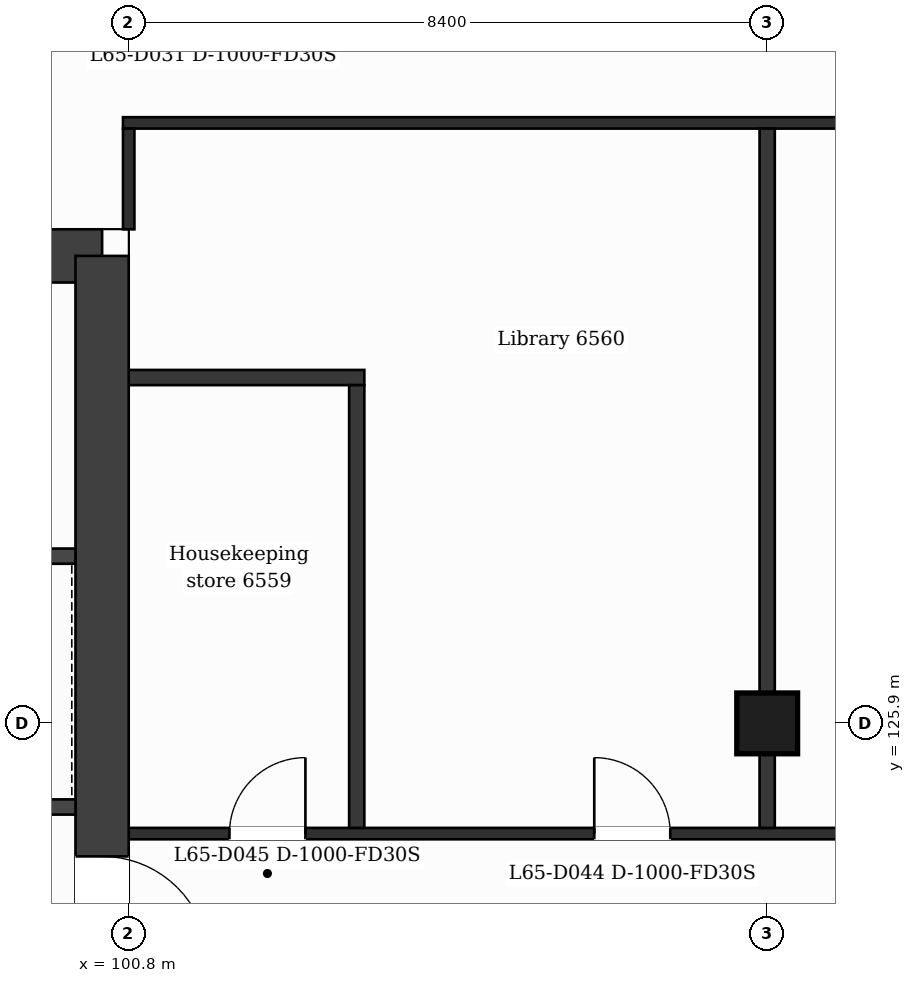
"""IFC4 building model, lengths in metres.
Left out: names, types, materials, properties, quantities, classifications, styles, units other than length and angle.
Written with IfcOpenShell. Run it as: python <this file> out.ifc"""

import sys

from ifc_helpers import new_model, si_unit, direction, frame, frame_2d, origin, origin_2d, place, context, subcontext, project, spatial, rectangle, extrude, element, fill, save


model = new_model("IFC4")
c1 = context("Model", 3, precision=1e-05, world=origin(), true_north=direction((0.0, 1.0)))
c2 = subcontext(c1, "Body", "Model", "MODEL_VIEW")
j1 = project(units=[si_unit("LENGTHUNIT", "METRE"), si_unit("PLANEANGLEUNIT", "RADIAN")], contexts=[c1])
p1 = place(None, origin())
s1 = spatial("IfcSite", under=j1, at=p1, CompositionType="ELEMENT")
p2 = place(p1, origin())
s2 = spatial("IfcBuilding", under=s1, at=p2, CompositionType="ELEMENT")
p3 = place(p2, frame((0.0, 0.0, 270.1)))
s3 = spatial("IfcBuildingStorey", under=s2, at=p3, CompositionType="ELEMENT", Elevation=270.1)
p4 = place(p3, frame((88.937, 132.05, 0.0), z_axis=(0.0, 0.0, 1.0), x_axis=(1.0, 0.0, 0.0)))
e1 = element("IfcWall", 1, at=p4, inside=s3, PredefinedType="SHEAR", context=c2, shape_type="SweptSolid", body=[
    extrude(rectangle(XDim=11.513, YDim=0.7, at=frame_2d((5.757, 0.0))), origin(), (0.0, 0.0, 1.0), 3.7),
])
p5 = place(p4, frame((6.927, 0.0, 0.0)))
e2 = element("IfcOpeningElement", 2, at=p5, cuts=e1, PredefinedType="OPENING", context=c2, shape_type="SweptSolid", body=[
    extrude(rectangle(XDim=1.2, YDim=2.1, at=frame_2d((0.6, 1.05))), frame((0.0, 0.36, 0.0), z_axis=(0.0, -1.0, 0.0), x_axis=(1.0, 0.0, 0.0)), (0.0, 0.0, 1.0), 0.72),
])
p6 = place(p3, frame((100.45, 132.05, 0.0), z_axis=(0.0, 0.0, 1.0), x_axis=(0.0, -1.0, 0.0)))
e3 = element("IfcWall", 3, at=p6, inside=s3, PredefinedType="SHEAR", context=c2, shape_type="SweptSolid", body=[
    extrude(rectangle(XDim=21.3, YDim=0.7, at=frame_2d((10.65, 0.0))), origin(), (0.0, 0.0, 1.0), 3.7),
])
p7 = place(p6, frame((7.9, 0.0, 0.0)))
e4 = element("IfcOpeningElement", 4, at=p7, cuts=e3, PredefinedType="OPENING", context=c2, shape_type="SweptSolid", body=[
    extrude(rectangle(XDim=1.4, YDim=2.1, at=frame_2d((0.7, 1.05))), frame((0.0, 0.36, 0.0), z_axis=(0.0, -1.0, 0.0), x_axis=(1.0, 0.0, 0.0)), (0.0, 0.0, 1.0), 0.72),
])
p8 = place(p3, frame((109.2, 125.9, 0.0), z_axis=(0.0, 0.0, 1.0), x_axis=(1.0, 0.0, 0.0)))
e5 = element("IfcColumn", 5, at=p8, inside=s3, PredefinedType="COLUMN", context=c2, shape_type="SweptSolid", body=[
    extrude(rectangle(XDim=0.8, YDim=0.8, at=origin_2d()), origin(), (0.0, 0.0, 1.0), 3.7),
])
p9 = place(p3, frame((100.8, 124.45, 0.0), z_axis=(0.0, 0.0, 1.0), x_axis=(1.0, 0.0, 0.0)))
e6 = element("IfcWall", 6, at=p9, inside=s3, PredefinedType="PARTITIONING", context=c2, shape_type="SweptSolid", body=[
    extrude(rectangle(XDim=25.2, YDim=0.15, at=frame_2d((12.6, 0.0))), origin(), (0.0, 0.0, 1.0), 3.38),
])
p10 = place(p9, frame((6.125, 0.0, 0.0)))
e7 = element("IfcOpeningElement", 7, at=p10, cuts=e6, PredefinedType="OPENING", context=c2, shape_type="SweptSolid", body=[
    extrude(rectangle(XDim=1.0, YDim=2.1, at=frame_2d((0.5, 1.05))), frame((0.0, 0.085, 0.0), z_axis=(0.0, -1.0, 0.0), x_axis=(1.0, 0.0, 0.0)), (0.0, 0.0, 1.0), 0.17),
])
p11 = place(p9, frame((1.325, 0.0, 0.0)))
e8 = element("IfcOpeningElement", 8, at=p11, cuts=e6, PredefinedType="OPENING", context=c2, shape_type="SweptSolid", body=[
    extrude(rectangle(XDim=1.0, YDim=2.1, at=frame_2d((0.5, 1.05))), frame((0.0, 0.085, 0.0), z_axis=(0.0, -1.0, 0.0), x_axis=(1.0, 0.0, 0.0)), (0.0, 0.0, 1.0), 0.17),
])
p12 = place(p9, frame((11.43, 0.0, 0.0)))
e9 = element("IfcOpeningElement", 9, at=p12, cuts=e6, PredefinedType="OPENING", context=c2, shape_type="SweptSolid", body=[
    extrude(rectangle(XDim=1.0, YDim=2.1, at=frame_2d((0.5, 1.05))), frame((0.0, 0.085, 0.0), z_axis=(0.0, -1.0, 0.0), x_axis=(1.0, 0.0, 0.0)), (0.0, 0.0, 1.0), 0.17),
])
p13 = place(p9, frame((21.17, 0.0, 0.0)))
e10 = element("IfcOpeningElement", 10, at=p13, cuts=e6, PredefinedType="OPENING", context=c2, shape_type="SweptSolid", body=[
    extrude(rectangle(XDim=1.0, YDim=2.1, at=frame_2d((0.5, 1.05))), frame((0.0, 0.085, 0.0), z_axis=(0.0, -1.0, 0.0), x_axis=(1.0, 0.0, 0.0)), (0.0, 0.0, 1.0), 0.17),
])
p14 = place(p3, frame((92.702, 124.8, 0.0), z_axis=(0.0, 0.0, 1.0), x_axis=(1.0, 0.0, 0.0)))
e11 = element("IfcWall", 11, at=p14, inside=s3, PredefinedType="PARTITIONING", context=c2, shape_type="SweptSolid", body=[
    extrude(rectangle(XDim=7.398, YDim=0.2, at=frame_2d((3.699, 0.0))), origin(), (0.0, 0.0, 1.0), 3.38),
])
p15 = place(p14, frame((5.636, 0.0, 0.0)))
e12 = element("IfcOpeningElement", 12, at=p15, cuts=e11, PredefinedType="OPENING", context=c2, shape_type="SweptSolid", body=[
    extrude(rectangle(XDim=1.1, YDim=2.1, at=frame_2d((0.55, 1.05))), frame((0.0, 0.11, 0.0), z_axis=(0.0, -1.0, 0.0), x_axis=(1.0, 0.0, 0.0)), (0.0, 0.0, 1.0), 0.22),
])
p16 = place(p3, frame((92.827, 128.1, 0.0), z_axis=(0.0, 0.0, 1.0), x_axis=(1.0, 0.0, 0.0)))
e13 = element("IfcWall", 13, at=p16, inside=s3, PredefinedType="PARTITIONING", context=c2, shape_type="SweptSolid", body=[
    extrude(rectangle(XDim=7.273, YDim=0.2, at=frame_2d((3.637, 0.0))), origin(), (0.0, 0.0, 1.0), 3.38),
])
p17 = place(p16, frame((2.93, 0.0, 0.0)))
e14 = element("IfcOpeningElement", 14, at=p17, cuts=e13, PredefinedType="OPENING", context=c2, shape_type="SweptSolid", body=[
    extrude(rectangle(XDim=1.1, YDim=2.1, at=frame_2d((0.55, 1.05))), frame((0.0, 0.11, 0.0), z_axis=(0.0, -1.0, 0.0), x_axis=(1.0, 0.0, 0.0)), (0.0, 0.0, 1.0), 0.22),
])
p18 = place(p3, frame((100.8, 130.45, 0.0), z_axis=(0.0, 0.0, 1.0), x_axis=(1.0, 0.0, 0.0)))
e15 = element("IfcWall", 15, at=p18, inside=s3, PredefinedType="PARTITIONING", context=c2, shape_type="SweptSolid", body=[
    extrude(rectangle(XDim=3.1, YDim=0.2, at=frame_2d((1.55, 0.0))), origin(), (0.0, 0.0, 1.0), 3.38),
])
p19 = place(p3, frame((100.725, 133.8, 0.0), z_axis=(0.0, 0.0, 1.0), x_axis=(1.0, 0.0, 0.0)))
e16 = element("IfcWall", 16, at=p19, inside=s3, PredefinedType="PARTITIONING", context=c2, shape_type="SweptSolid", body=[
    extrude(rectangle(XDim=25.35, YDim=0.15, at=frame_2d((12.675, 0.0))), origin(), (0.0, 0.0, 1.0), 3.38),
])
p20 = place(p3, frame((100.8, 132.4, 0.0), z_axis=(0.0, 0.0, 1.0), x_axis=(0.0, 1.0, 0.0)))
e17 = element("IfcWall", 17, at=p20, inside=s3, PredefinedType="PARTITIONING", context=c2, shape_type="SweptSolid", body=[
    extrude(rectangle(XDim=1.325, YDim=0.15, at=frame_2d((0.663, 0.0))), origin(), (0.0, 0.0, 1.0), 3.38),
])
p21 = place(p3, frame((103.8, 124.525, 0.0), z_axis=(0.0, 0.0, 1.0), x_axis=(0.0, 1.0, 0.0)))
e18 = element("IfcWall", 18, at=p21, inside=s3, PredefinedType="PARTITIONING", context=c2, shape_type="SweptSolid", body=[
    extrude(rectangle(XDim=5.825, YDim=0.2, at=frame_2d((2.913, 0.0))), origin(), (0.0, 0.0, 1.0), 3.38),
])
p22 = place(p3, frame((109.2, 124.525, 0.0), z_axis=(0.0, 0.0, 1.0), x_axis=(0.0, 1.0, 0.0)))
e19 = element("IfcWall", 19, at=p22, inside=s3, PredefinedType="PARTITIONING", context=c2, shape_type="SweptSolid", body=[
    extrude(rectangle(XDim=9.2, YDim=0.2, at=frame_2d((4.6, 0.0))), origin(), (0.0, 0.0, 1.0), 3.38),
])
p23 = place(p10, origin())
e20 = element("IfcDoor", 20, at=p23, inside=s3, OperationType="SINGLE_SWING_LEFT", PredefinedType="DOOR", context=c2, shape_type="SweptSolid", body=[
    extrude(rectangle(XDim=1.0, YDim=2.1, at=frame_2d((0.5, 1.05))), frame((0.0, 0.025, 0.0), z_axis=(0.0, -1.0, 0.0), x_axis=(1.0, 0.0, 0.0)), (0.0, 0.0, 1.0), 0.05),
])
fill(e7, e20)
p24 = place(p11, origin())
e21 = element("IfcDoor", 21, at=p24, inside=s3, OperationType="SINGLE_SWING_RIGHT", PredefinedType="DOOR", context=c2, shape_type="SweptSolid", body=[
    extrude(rectangle(XDim=1.0, YDim=2.1, at=frame_2d((0.5, 1.05))), frame((0.0, 0.025, 0.0), z_axis=(0.0, -1.0, 0.0), x_axis=(1.0, 0.0, 0.0)), (0.0, 0.0, 1.0), 0.05),
])
fill(e8, e21)
p25 = place(p7, origin())
e22 = element("IfcDoor", 22, at=p25, inside=s3, OperationType="SINGLE_SWING_RIGHT", PredefinedType="DOOR", context=c2, shape_type="SweptSolid", body=[
    extrude(rectangle(XDim=1.4, YDim=2.1, at=frame_2d((0.7, 1.05))), frame((0.0, 0.025, 0.0), z_axis=(0.0, -1.0, 0.0), x_axis=(1.0, 0.0, 0.0)), (0.0, 0.0, 1.0), 0.05),
])
fill(e4, e22)
save(model, sys.argv[1])
